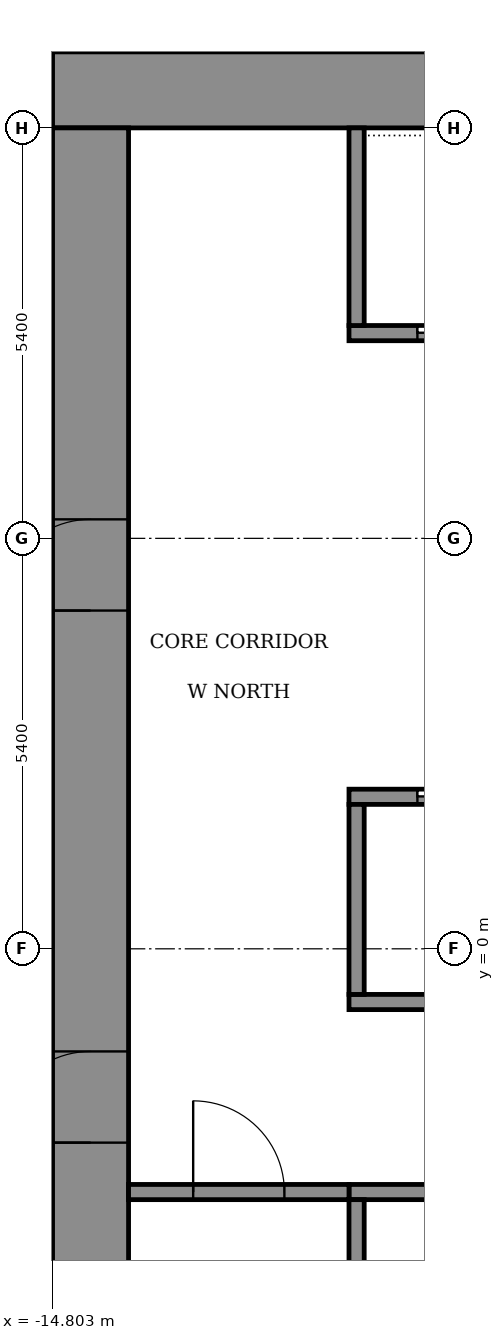
"""IFC4 building model, lengths in metres.
Left out: names, types, materials, properties, quantities, classifications, styles, units other than length and angle.
Written with IfcOpenShell. Run it as: python <this file> out.ifc"""

import sys

from ifc_helpers import new_model, si_unit, direction, frame, frame_2d, origin, place, context, subcontext, project, spatial, rectangle, extrude, element, fill, save


model = new_model("IFC4")
c1 = context("Model", 3, precision=1e-05, world=origin(), true_north=direction((0.0, 1.0)))
c2 = subcontext(c1, "Body", "Model", "MODEL_VIEW")
j1 = project(units=[si_unit("LENGTHUNIT", "METRE"), si_unit("PLANEANGLEUNIT", "RADIAN")], contexts=[c1])
p1 = place(None, origin())
s1 = spatial("IfcSite", under=j1, at=p1, CompositionType="ELEMENT")
p2 = place(p1, origin())
s2 = spatial("IfcBuilding", under=s1, at=p2, CompositionType="ELEMENT")
p3 = place(p2, frame((0.0, 0.0, 97.3)))
s3 = spatial("IfcBuildingStorey", under=s2, at=p3, CompositionType="ELEMENT", Elevation=97.3)
p4 = place(p3, frame((-14.8, 11.3, 0.0), z_axis=(0.0, 0.0, 1.0), x_axis=(1.0, 0.0, 0.0)))
e1 = element("IfcWall", 1, at=p4, inside=s3, PredefinedType="SHEAR", context=c2, shape_type="SweptSolid", body=[
    extrude(rectangle(XDim=29.6, YDim=1.0, at=frame_2d((14.8, 0.0))), origin(), (0.0, 0.0, 1.0), 4.6),
])
p5 = place(p3, frame((-14.3, -10.8, 0.0), z_axis=(0.0, 0.0, 1.0), x_axis=(0.0, 1.0, 0.0)))
e2 = element("IfcWall", 2, at=p5, inside=s3, PredefinedType="SHEAR", context=c2, shape_type="SweptSolid", body=[
    extrude(rectangle(XDim=21.6, YDim=1.0, at=frame_2d((10.8, 0.0))), origin(), (0.0, 0.0, 1.0), 4.6),
])
p6 = place(p5, frame((8.25, 0.0, 0.0)))
e3 = element("IfcOpeningElement", 3, at=p6, cuts=e2, PredefinedType="OPENING", context=c2, shape_type="SweptSolid", body=[
    extrude(rectangle(XDim=1.2, YDim=2.1, at=frame_2d((0.6, 1.05))), frame((0.0, 0.51, 0.0), z_axis=(0.0, -1.0, 0.0), x_axis=(1.0, 0.0, 0.0)), (0.0, 0.0, 1.0), 1.02),
])
p7 = place(p5, frame((15.25, 0.0, 0.0)))
e4 = element("IfcOpeningElement", 4, at=p7, cuts=e2, PredefinedType="OPENING", context=c2, shape_type="SweptSolid", body=[
    extrude(rectangle(XDim=1.2, YDim=2.1, at=frame_2d((0.6, 1.05))), frame((0.0, 0.51, 0.0), z_axis=(0.0, -1.0, 0.0), x_axis=(1.0, 0.0, 0.0)), (0.0, 0.0, 1.0), 1.02),
])
p8 = place(p3, frame((-10.9, -3.2, 0.0), z_axis=(0.0, 0.0, 1.0), x_axis=(1.0, 0.0, 0.0)))
e5 = element("IfcWall", 5, at=p8, inside=s3, PredefinedType="SHEAR", context=c2, shape_type="SweptSolid", body=[
    extrude(rectangle(XDim=21.8, YDim=0.2, at=frame_2d((10.9, 0.0))), origin(), (0.0, 0.0, 1.0), 4.05),
])
p9 = place(p8, frame((1.075, 0.0, 0.0)))
e6 = element("IfcOpeningElement", 6, at=p9, cuts=e5, PredefinedType="OPENING", context=c2, shape_type="SweptSolid", body=[
    extrude(rectangle(XDim=1.1, YDim=2.1, at=frame_2d((0.55, 1.05))), frame((0.0, 0.11, 0.0), z_axis=(0.0, -1.0, 0.0), x_axis=(1.0, 0.0, 0.0)), (0.0, 0.0, 1.0), 0.22),
])
p10 = place(p8, frame((10.325, 0.0, 0.0)))
e7 = element("IfcOpeningElement", 7, at=p10, cuts=e5, PredefinedType="OPENING", context=c2, shape_type="SweptSolid", body=[
    extrude(rectangle(XDim=1.1, YDim=2.1, at=frame_2d((0.55, 1.05))), frame((0.0, 0.11, 0.0), z_axis=(0.0, -1.0, 0.0), x_axis=(1.0, 0.0, 0.0)), (0.0, 0.0, 1.0), 0.22),
])
p11 = place(p8, frame((19.625, 0.0, 0.0)))
e8 = element("IfcOpeningElement", 8, at=p11, cuts=e5, PredefinedType="OPENING", context=c2, shape_type="SweptSolid", body=[
    extrude(rectangle(XDim=1.1, YDim=2.1, at=frame_2d((0.55, 1.05))), frame((0.0, 0.11, 0.0), z_axis=(0.0, -1.0, 0.0), x_axis=(1.0, 0.0, 0.0)), (0.0, 0.0, 1.0), 0.22),
])
p12 = place(p8, frame((5.7, 0.0, 0.0)))
e9 = element("IfcOpeningElement", 9, at=p12, cuts=e5, PredefinedType="OPENING", context=c2, shape_type="SweptSolid", body=[
    extrude(rectangle(XDim=1.1, YDim=2.1, at=frame_2d((0.55, 1.05))), frame((0.0, 0.11, 0.0), z_axis=(0.0, -1.0, 0.0), x_axis=(1.0, 0.0, 0.0)), (0.0, 0.0, 1.0), 0.22),
])
p13 = place(p8, frame((14.975, 0.0, 0.0)))
e10 = element("IfcOpeningElement", 10, at=p13, cuts=e5, PredefinedType="OPENING", context=c2, shape_type="SweptSolid", body=[
    extrude(rectangle(XDim=1.1, YDim=2.1, at=frame_2d((0.55, 1.05))), frame((0.0, 0.11, 0.0), z_axis=(0.0, -1.0, 0.0), x_axis=(1.0, 0.0, 0.0)), (0.0, 0.0, 1.0), 0.22),
])
p14 = place(p3, frame((-10.9, -0.7, 0.0), z_axis=(0.0, 0.0, 1.0), x_axis=(1.0, 0.0, 0.0)))
e11 = element("IfcWall", 11, at=p14, inside=s3, PredefinedType="SHEAR", context=c2, shape_type="SweptSolid", body=[
    extrude(rectangle(XDim=21.8, YDim=0.2, at=frame_2d((10.9, 0.0))), origin(), (0.0, 0.0, 1.0), 4.05),
])
p15 = place(p3, frame((-10.9, 2.0, 0.0), z_axis=(0.0, 0.0, 1.0), x_axis=(1.0, 0.0, 0.0)))
e12 = element("IfcWall", 12, at=p15, inside=s3, PredefinedType="SHEAR", context=c2, shape_type="SweptSolid", body=[
    extrude(rectangle(XDim=21.8, YDim=0.2, at=frame_2d((10.9, 0.0))), origin(), (0.0, 0.0, 1.0), 4.05),
])
p16 = place(p15, frame((0.9, 0.0, 0.0)))
e13 = element("IfcOpeningElement", 13, at=p16, cuts=e12, PredefinedType="OPENING", context=c2, shape_type="SweptSolid", body=[
    extrude(rectangle(XDim=1.1, YDim=2.1, at=frame_2d((0.55, 1.05))), frame((0.0, 0.11, 0.0), z_axis=(0.0, -1.0, 0.0), x_axis=(1.0, 0.0, 0.0)), (0.0, 0.0, 1.0), 0.22),
])
p17 = place(p15, frame((3.6, 0.0, 0.0)))
e14 = element("IfcOpeningElement", 14, at=p17, cuts=e12, PredefinedType="OPENING", context=c2, shape_type="SweptSolid", body=[
    extrude(rectangle(XDim=1.1, YDim=2.1, at=frame_2d((0.55, 1.05))), frame((0.0, 0.11, 0.0), z_axis=(0.0, -1.0, 0.0), x_axis=(1.0, 0.0, 0.0)), (0.0, 0.0, 1.0), 0.22),
])
p18 = place(p15, frame((6.3, 0.0, 0.0)))
e15 = element("IfcOpeningElement", 15, at=p18, cuts=e12, PredefinedType="OPENING", context=c2, shape_type="SweptSolid", body=[
    extrude(rectangle(XDim=1.1, YDim=2.1, at=frame_2d((0.55, 1.05))), frame((0.0, 0.11, 0.0), z_axis=(0.0, -1.0, 0.0), x_axis=(1.0, 0.0, 0.0)), (0.0, 0.0, 1.0), 0.22),
])
p19 = place(p15, frame((9.0, 0.0, 0.0)))
e16 = element("IfcOpeningElement", 16, at=p19, cuts=e12, PredefinedType="OPENING", context=c2, shape_type="SweptSolid", body=[
    extrude(rectangle(XDim=1.1, YDim=2.1, at=frame_2d((0.55, 1.05))), frame((0.0, 0.11, 0.0), z_axis=(0.0, -1.0, 0.0), x_axis=(1.0, 0.0, 0.0)), (0.0, 0.0, 1.0), 0.22),
])
p20 = place(p15, frame((11.7, 0.0, 0.0)))
e17 = element("IfcOpeningElement", 17, at=p20, cuts=e12, PredefinedType="OPENING", context=c2, shape_type="SweptSolid", body=[
    extrude(rectangle(XDim=1.1, YDim=2.1, at=frame_2d((0.55, 1.05))), frame((0.0, 0.11, 0.0), z_axis=(0.0, -1.0, 0.0), x_axis=(1.0, 0.0, 0.0)), (0.0, 0.0, 1.0), 0.22),
])
p21 = place(p15, frame((15.85, 0.0, 0.0)))
e18 = element("IfcOpeningElement", 18, at=p21, cuts=e12, PredefinedType="OPENING", context=c2, shape_type="SweptSolid", body=[
    extrude(rectangle(XDim=0.9, YDim=2.1, at=frame_2d((0.45, 1.05))), frame((0.0, 0.11, 0.0), z_axis=(0.0, -1.0, 0.0), x_axis=(1.0, 0.0, 0.0)), (0.0, 0.0, 1.0), 0.22),
])
p22 = place(p15, frame((19.9, 0.0, 0.0)))
e19 = element("IfcOpeningElement", 19, at=p22, cuts=e12, PredefinedType="OPENING", context=c2, shape_type="SweptSolid", body=[
    extrude(rectangle(XDim=0.9, YDim=2.1, at=frame_2d((0.45, 1.05))), frame((0.0, 0.11, 0.0), z_axis=(0.0, -1.0, 0.0), x_axis=(1.0, 0.0, 0.0)), (0.0, 0.0, 1.0), 0.22),
])
p23 = place(p3, frame((-10.9, 8.1, 0.0), z_axis=(0.0, 0.0, 1.0), x_axis=(1.0, 0.0, 0.0)))
e20 = element("IfcWall", 20, at=p23, inside=s3, PredefinedType="SHEAR", context=c2, shape_type="SweptSolid", body=[
    extrude(rectangle(XDim=21.8, YDim=0.2, at=frame_2d((10.9, 0.0))), origin(), (0.0, 0.0, 1.0), 4.05),
])
p24 = place(p23, frame((0.9, 0.0, 0.0)))
e21 = element("IfcOpeningElement", 21, at=p24, cuts=e20, PredefinedType="OPENING", context=c2, shape_type="SweptSolid", body=[
    extrude(rectangle(XDim=1.1, YDim=2.1, at=frame_2d((0.55, 1.05))), frame((0.0, 0.11, 0.0), z_axis=(0.0, -1.0, 0.0), x_axis=(1.0, 0.0, 0.0)), (0.0, 0.0, 1.0), 0.22),
])
p25 = place(p23, frame((3.6, 0.0, 0.0)))
e22 = element("IfcOpeningElement", 22, at=p25, cuts=e20, PredefinedType="OPENING", context=c2, shape_type="SweptSolid", body=[
    extrude(rectangle(XDim=1.1, YDim=2.1, at=frame_2d((0.55, 1.05))), frame((0.0, 0.11, 0.0), z_axis=(0.0, -1.0, 0.0), x_axis=(1.0, 0.0, 0.0)), (0.0, 0.0, 1.0), 0.22),
])
p26 = place(p23, frame((6.3, 0.0, 0.0)))
e23 = element("IfcOpeningElement", 23, at=p26, cuts=e20, PredefinedType="OPENING", context=c2, shape_type="SweptSolid", body=[
    extrude(rectangle(XDim=1.1, YDim=2.1, at=frame_2d((0.55, 1.05))), frame((0.0, 0.11, 0.0), z_axis=(0.0, -1.0, 0.0), x_axis=(1.0, 0.0, 0.0)), (0.0, 0.0, 1.0), 0.22),
])
p27 = place(p23, frame((9.0, 0.0, 0.0)))
e24 = element("IfcOpeningElement", 24, at=p27, cuts=e20, PredefinedType="OPENING", context=c2, shape_type="SweptSolid", body=[
    extrude(rectangle(XDim=1.1, YDim=2.1, at=frame_2d((0.55, 1.05))), frame((0.0, 0.11, 0.0), z_axis=(0.0, -1.0, 0.0), x_axis=(1.0, 0.0, 0.0)), (0.0, 0.0, 1.0), 0.22),
])
p28 = place(p23, frame((11.7, 0.0, 0.0)))
e25 = element("IfcOpeningElement", 25, at=p28, cuts=e20, PredefinedType="OPENING", context=c2, shape_type="SweptSolid", body=[
    extrude(rectangle(XDim=1.1, YDim=2.1, at=frame_2d((0.55, 1.05))), frame((0.0, 0.11, 0.0), z_axis=(0.0, -1.0, 0.0), x_axis=(1.0, 0.0, 0.0)), (0.0, 0.0, 1.0), 0.22),
])
p29 = place(p23, frame((17.2, 0.0, 0.0)))
e26 = element("IfcOpeningElement", 26, at=p29, cuts=e20, PredefinedType="OPENING", context=c2, shape_type="SweptSolid", body=[
    extrude(rectangle(XDim=0.9, YDim=2.1, at=frame_2d((0.45, 1.05))), frame((0.0, 0.11, 0.0), z_axis=(0.0, -1.0, 0.0), x_axis=(1.0, 0.0, 0.0)), (0.0, 0.0, 1.0), 0.22),
])
p30 = place(p3, frame((-10.8, -10.8, 0.0), z_axis=(0.0, 0.0, 1.0), x_axis=(0.0, 1.0, 0.0)))
e27 = element("IfcWall", 27, at=p30, inside=s3, PredefinedType="SHEAR", context=c2, shape_type="SweptSolid", body=[
    extrude(rectangle(XDim=7.5, YDim=0.2, at=frame_2d((3.75, 0.0))), origin(), (0.0, 0.0, 1.0), 4.05),
])
p31 = place(p3, frame((-10.8, -0.6, 0.0), z_axis=(0.0, 0.0, 1.0), x_axis=(0.0, 1.0, 0.0)))
e28 = element("IfcWall", 28, at=p31, inside=s3, PredefinedType="SHEAR", context=c2, shape_type="SweptSolid", body=[
    extrude(rectangle(XDim=2.5, YDim=0.2, at=frame_2d((1.25, 0.0))), origin(), (0.0, 0.0, 1.0), 4.05),
])
p32 = place(p3, frame((-10.8, 8.2, 0.0), z_axis=(0.0, 0.0, 1.0), x_axis=(0.0, 1.0, 0.0)))
e29 = element("IfcWall", 29, at=p32, inside=s3, PredefinedType="SHEAR", context=c2, shape_type="SweptSolid", body=[
    extrude(rectangle(XDim=2.6, YDim=0.2, at=frame_2d((1.3, 0.0))), origin(), (0.0, 0.0, 1.0), 4.05),
])
p33 = place(p3, frame((-13.8, -3.2, 0.0), z_axis=(0.0, 0.0, 1.0), x_axis=(1.0, 0.0, 0.0)))
e30 = element("IfcWall", 30, at=p33, inside=s3, PredefinedType="STANDARD", context=c2, shape_type="SweptSolid", body=[
    extrude(rectangle(XDim=2.9, YDim=0.2, at=frame_2d((1.45, 0.0))), origin(), (0.0, 0.0, 1.0), 4.05),
])
p34 = place(p33, frame((0.85, 0.0, 0.0)))
e31 = element("IfcOpeningElement", 31, at=p34, cuts=e30, PredefinedType="OPENING", context=c2, shape_type="SweptSolid", body=[
    extrude(rectangle(XDim=1.2, YDim=2.1, at=frame_2d((0.6, 1.05))), frame((0.0, 0.11, 0.0), z_axis=(0.0, -1.0, 0.0), x_axis=(1.0, 0.0, 0.0)), (0.0, 0.0, 1.0), 0.22),
])
p35 = place(p6, origin())
e32 = element("IfcDoor", 32, at=p35, inside=s3, OperationType="DOUBLE_DOOR_SINGLE_SWING", PredefinedType="DOOR", context=c2, shape_type="SweptSolid", body=[
    extrude(rectangle(XDim=1.2, YDim=2.1, at=frame_2d((0.6, 1.05))), frame((0.0, 0.025, 0.0), z_axis=(0.0, -1.0, 0.0), x_axis=(1.0, 0.0, 0.0)), (0.0, 0.0, 1.0), 0.05),
])
fill(e3, e32)
p36 = place(p7, origin())
e33 = element("IfcDoor", 33, at=p36, inside=s3, OperationType="DOUBLE_DOOR_SINGLE_SWING", PredefinedType="DOOR", context=c2, shape_type="SweptSolid", body=[
    extrude(rectangle(XDim=1.2, YDim=2.1, at=frame_2d((0.6, 1.05))), frame((0.0, 0.025, 0.0), z_axis=(0.0, -1.0, 0.0), x_axis=(1.0, 0.0, 0.0)), (0.0, 0.0, 1.0), 0.05),
])
fill(e4, e33)
p37 = place(p16, origin())
e34 = element("IfcDoor", 34, at=p37, inside=s3, OperationType="SLIDING_TO_LEFT", PredefinedType="DOOR", context=c2, shape_type="SweptSolid", body=[
    extrude(rectangle(XDim=1.1, YDim=2.1, at=frame_2d((0.55, 1.05))), frame((0.0, 0.025, 0.0), z_axis=(0.0, -1.0, 0.0), x_axis=(1.0, 0.0, 0.0)), (0.0, 0.0, 1.0), 0.05),
])
fill(e13, e34)
p38 = place(p24, origin())
e35 = element("IfcDoor", 35, at=p38, inside=s3, OperationType="SLIDING_TO_LEFT", PredefinedType="DOOR", context=c2, shape_type="SweptSolid", body=[
    extrude(rectangle(XDim=1.1, YDim=2.1, at=frame_2d((0.55, 1.05))), frame((0.0, 0.025, 0.0), z_axis=(0.0, -1.0, 0.0), x_axis=(1.0, 0.0, 0.0)), (0.0, 0.0, 1.0), 0.05),
])
fill(e21, e35)
p39 = place(p34, origin())
e36 = element("IfcDoor", 36, at=p39, inside=s3, OperationType="SINGLE_SWING_LEFT", PredefinedType="DOOR", context=c2, shape_type="SweptSolid", body=[
    extrude(rectangle(XDim=1.2, YDim=2.1, at=frame_2d((0.6, 1.05))), frame((0.0, 0.025, 0.0), z_axis=(0.0, -1.0, 0.0), x_axis=(1.0, 0.0, 0.0)), (0.0, 0.0, 1.0), 0.05),
])
fill(e31, e36)
save(model, sys.argv[1])
